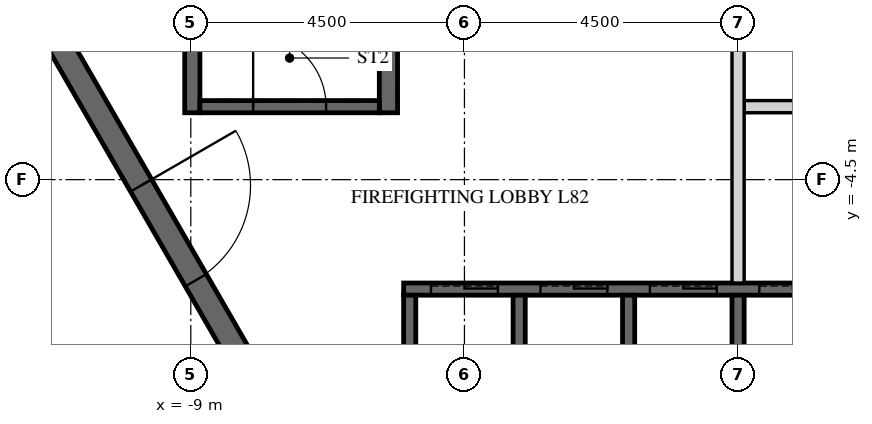
"""IFC4 building model, lengths in metres.
Left out: names, types, materials, properties, quantities, classifications, styles, units other than length and angle.
Written with IfcOpenShell. Run it as: python <this file> out.ifc"""

import sys

from ifc_helpers import new_model, si_unit, direction, frame, frame_2d, origin, place, context, subcontext, project, spatial, polyline, rectangle, outline, extrude, element, fill, save


model = new_model("IFC4")
c1 = context("Model", 3, precision=1e-05, world=origin(), true_north=direction((0.0, 1.0)))
c2 = subcontext(c1, "Body", "Model", "MODEL_VIEW")
j1 = project(units=[si_unit("LENGTHUNIT", "METRE"), si_unit("PLANEANGLEUNIT", "RADIAN")], contexts=[c1])
p1 = place(None, origin())
s1 = spatial("IfcSite", under=j1, at=p1, CompositionType="ELEMENT")
p2 = place(p1, origin())
s2 = spatial("IfcBuilding", under=s1, at=p2, CompositionType="ELEMENT")
p3 = place(p2, frame((0.0, 0.0, 338.1)))
s3 = spatial("IfcBuildingStorey", under=s2, at=p3, CompositionType="ELEMENT", Elevation=338.1)
p4 = place(p3, frame((-12.471, 0.0, -0.3), z_axis=(0.0, 0.0, 1.0), x_axis=(0.499996419489, -0.866027470984, 0.0)))
e1 = element("IfcWall", 1, at=p4, inside=s3, PredefinedType="SHEAR", context=c2, shape_type="SweptSolid", body=[
    extrude(outline(polyline([(-0.115, -0.2), (12.586, -0.2), (12.355, 0.2), (0.115, 0.2), (-0.115, -0.2)])), origin(), (0.0, 0.0, 1.0), 5.4),
])
p5 = place(p4, frame((5.306, 0.0, 0.3)))
e2 = element("IfcOpeningElement", 2, at=p5, cuts=e1, PredefinedType="OPENING", context=c2, shape_type="SweptSolid", body=[
    extrude(rectangle(XDim=1.8, YDim=2.4, at=frame_2d((0.9, 1.2))), frame((0.0, 0.21, 0.0), z_axis=(0.0, -1.0, 0.0), x_axis=(1.0, 0.0, 0.0)), (0.0, 0.0, 1.0), 0.42),
])
p6 = place(p3, frame((-5.5, -6.3, -0.25), z_axis=(0.0, 0.0, 1.0), x_axis=(1.0, 0.0, 0.0)))
e3 = element("IfcWall", 3, at=p6, inside=s3, PredefinedType="SHEAR", context=c2, shape_type="SweptSolid", body=[
    extrude(rectangle(XDim=9.2, YDim=0.2, at=frame_2d((4.6, 0.0))), origin(), (0.0, 0.0, 1.0), 5.4),
])
p7 = place(p6, frame((0.45, 0.0, 0.25)))
e4 = element("IfcOpeningElement", 4, at=p7, cuts=e3, PredefinedType="OPENING", context=c2, shape_type="SweptSolid", body=[
    extrude(rectangle(XDim=1.1, YDim=2.1, at=frame_2d((0.55, 1.05))), frame((0.0, 0.11, 0.0), z_axis=(0.0, -1.0, 0.0), x_axis=(1.0, 0.0, 0.0)), (0.0, 0.0, 1.0), 0.22),
])
p8 = place(p6, frame((2.25, 0.0, 0.25)))
e5 = element("IfcOpeningElement", 5, at=p8, cuts=e3, PredefinedType="OPENING", context=c2, shape_type="SweptSolid", body=[
    extrude(rectangle(XDim=1.1, YDim=2.1, at=frame_2d((0.55, 1.05))), frame((0.0, 0.11, 0.0), z_axis=(0.0, -1.0, 0.0), x_axis=(1.0, 0.0, 0.0)), (0.0, 0.0, 1.0), 0.22),
])
p9 = place(p6, frame((4.05, 0.0, 0.25)))
e6 = element("IfcOpeningElement", 6, at=p9, cuts=e3, PredefinedType="OPENING", context=c2, shape_type="SweptSolid", body=[
    extrude(rectangle(XDim=1.1, YDim=2.1, at=frame_2d((0.55, 1.05))), frame((0.0, 0.11, 0.0), z_axis=(0.0, -1.0, 0.0), x_axis=(1.0, 0.0, 0.0)), (0.0, 0.0, 1.0), 0.22),
])
p10 = place(p6, frame((5.85, 0.0, 0.25)))
e7 = element("IfcOpeningElement", 7, at=p10, cuts=e3, PredefinedType="OPENING", context=c2, shape_type="SweptSolid", body=[
    extrude(rectangle(XDim=1.1, YDim=2.1, at=frame_2d((0.55, 1.05))), frame((0.0, 0.11, 0.0), z_axis=(0.0, -1.0, 0.0), x_axis=(1.0, 0.0, 0.0)), (0.0, 0.0, 1.0), 0.22),
])
p11 = place(p6, frame((7.65, 0.0, 0.25)))
e8 = element("IfcOpeningElement", 8, at=p11, cuts=e3, PredefinedType="OPENING", context=c2, shape_type="SweptSolid", body=[
    extrude(rectangle(XDim=1.1, YDim=2.1, at=frame_2d((0.55, 1.05))), frame((0.0, 0.11, 0.0), z_axis=(0.0, -1.0, 0.0), x_axis=(1.0, 0.0, 0.0)), (0.0, 0.0, 1.0), 0.22),
])
for number, where, z_axis, x_axis in (
    (9, (-5.4, -9.3, -0.25), (0.0, 0.0, 1.0), (0.0, 1.0, 0.0)),
    (10, (-3.6, -9.3, -0.25), (0.0, 0.0, 1.0), (0.0, 1.0, 0.0)),
    (11, (-1.8, -9.3, -0.25), (0.0, 0.0, 1.0), (0.0, 1.0, 0.0)),
    (12, (0.0, -9.3, -0.25), (0.0, 0.0, 1.0), (0.0, 1.0, 0.0)),
):
    element("IfcWall", number, at=place(p3, frame(where, z_axis=z_axis, x_axis=x_axis)), inside=s3, PredefinedType="SHEAR", context=c2, shape_type="SweptSolid", body=[
        extrude(rectangle(XDim=2.9, YDim=0.2, at=frame_2d((1.45, 0.0))), origin(), (0.0, 0.0, 1.0), 5.4),
    ])
p12 = place(p3, frame((0.1, -3.3, 0.0), z_axis=(0.0, 0.0, 1.0), x_axis=(1.0, 0.0, 0.0)))
e13 = element("IfcWall", 13, at=p12, inside=s3, PredefinedType="PARTITIONING", context=c2, shape_type="SweptSolid", body=[
    extrude(rectangle(XDim=2.85, YDim=0.2, at=frame_2d((1.425, 0.0))), origin(), (0.0, 0.0, 1.0), 5.15),
])
p13 = place(p12, frame((0.875, 0.0, 0.0)))
e14 = element("IfcOpeningElement", 14, at=p13, cuts=e13, PredefinedType="OPENING", context=c2, shape_type="SweptSolid", body=[
    extrude(rectangle(XDim=0.9, YDim=2.1, at=frame_2d((0.45, 1.05))), frame((0.0, 0.11, 0.0), z_axis=(0.0, -1.0, 0.0), x_axis=(1.0, 0.0, 0.0)), (0.0, 0.0, 1.0), 0.22),
])
p14 = place(p3, frame((0.0, -6.2, 0.0), z_axis=(0.0, 0.0, 1.0), x_axis=(0.0, 1.0, 0.0)))
e15 = element("IfcWall", 15, at=p14, inside=s3, PredefinedType="PARTITIONING", context=c2, shape_type="SweptSolid", body=[
    extrude(rectangle(XDim=6.1, YDim=0.2, at=frame_2d((3.05, 0.0))), origin(), (0.0, 0.0, 1.0), 5.15),
])
p15 = place(p3, frame((-5.75, -3.4, -0.25), z_axis=(0.0, 0.0, 1.0), x_axis=(0.0, 1.0, 0.0)))
e16 = element("IfcWall", 16, at=p15, inside=s3, PredefinedType="SHEAR", context=c2, shape_type="SweptSolid", body=[
    extrude(rectangle(XDim=6.8, YDim=0.3, at=frame_2d((3.4, 0.0))), origin(), (0.0, 0.0, 1.0), 5.4),
])
p16 = place(p3, frame((-8.975, -3.4, -0.25), z_axis=(0.0, 0.0, 1.0), x_axis=(0.0, 1.0, 0.0)))
e17 = element("IfcWall", 17, at=p16, inside=s3, PredefinedType="SHEAR", context=c2, shape_type="SweptSolid", body=[
    extrude(rectangle(XDim=6.8, YDim=0.25, at=frame_2d((3.4, 0.0))), origin(), (0.0, 0.0, 1.0), 5.4),
])
p17 = place(p3, frame((-8.85, -3.3, -0.25), z_axis=(0.0, 0.0, 1.0), x_axis=(1.0, 0.0, 0.0)))
e18 = element("IfcWall", 18, at=p17, inside=s3, PredefinedType="SHEAR", context=c2, shape_type="SweptSolid", body=[
    extrude(rectangle(XDim=2.95, YDim=0.2, at=frame_2d((1.475, 0.0))), origin(), (0.0, 0.0, 1.0), 5.4),
])
p18 = place(p17, frame((0.875, 0.0, 0.25)))
e19 = element("IfcOpeningElement", 19, at=p18, cuts=e18, PredefinedType="OPENING", context=c2, shape_type="SweptSolid", body=[
    extrude(rectangle(XDim=1.2, YDim=2.4, at=frame_2d((0.6, 1.2))), frame((0.0, 0.11, 0.0), z_axis=(0.0, -1.0, 0.0), x_axis=(1.0, 0.0, 0.0)), (0.0, 0.0, 1.0), 0.22),
])
p19 = place(p5, origin())
e20 = element("IfcDoor", 20, at=p19, inside=s3, OperationType="DOUBLE_DOOR_SINGLE_SWING", PredefinedType="DOOR", context=c2, shape_type="SweptSolid", body=[
    extrude(rectangle(XDim=1.8, YDim=2.4, at=frame_2d((0.9, 1.2))), frame((0.0, 0.025, 0.0), z_axis=(0.0, -1.0, 0.0), x_axis=(1.0, 0.0, 0.0)), (0.0, 0.0, 1.0), 0.05),
])
fill(e2, e20)
p20 = place(p18, origin())
e21 = element("IfcDoor", 21, at=p20, inside=s3, OperationType="SINGLE_SWING_LEFT", PredefinedType="DOOR", context=c2, shape_type="SweptSolid", body=[
    extrude(rectangle(XDim=1.2, YDim=2.4, at=frame_2d((0.6, 1.2))), frame((0.0, 0.025, 0.0), z_axis=(0.0, -1.0, 0.0), x_axis=(1.0, 0.0, 0.0)), (0.0, 0.0, 1.0), 0.05),
])
fill(e19, e21)
p21 = place(p7, origin())
e22 = element("IfcDoor", 22, at=p21, inside=s3, OperationType="SLIDING_TO_LEFT", PredefinedType="DOOR", context=c2, shape_type="SweptSolid", body=[
    extrude(rectangle(XDim=1.1, YDim=2.1, at=frame_2d((0.55, 1.05))), frame((0.0, 0.025, 0.0), z_axis=(0.0, -1.0, 0.0), x_axis=(1.0, 0.0, 0.0)), (0.0, 0.0, 1.0), 0.05),
])
fill(e4, e22)
p22 = place(p8, origin())
e23 = element("IfcDoor", 23, at=p22, inside=s3, OperationType="SLIDING_TO_LEFT", PredefinedType="DOOR", context=c2, shape_type="SweptSolid", body=[
    extrude(rectangle(XDim=1.1, YDim=2.1, at=frame_2d((0.55, 1.05))), frame((0.0, 0.025, 0.0), z_axis=(0.0, -1.0, 0.0), x_axis=(1.0, 0.0, 0.0)), (0.0, 0.0, 1.0), 0.05),
])
fill(e5, e23)
p23 = place(p9, origin())
e24 = element("IfcDoor", 24, at=p23, inside=s3, OperationType="SLIDING_TO_LEFT", PredefinedType="DOOR", context=c2, shape_type="SweptSolid", body=[
    extrude(rectangle(XDim=1.1, YDim=2.1, at=frame_2d((0.55, 1.05))), frame((0.0, 0.025, 0.0), z_axis=(0.0, -1.0, 0.0), x_axis=(1.0, 0.0, 0.0)), (0.0, 0.0, 1.0), 0.05),
])
fill(e6, e24)
p24 = place(p10, origin())
e25 = element("IfcDoor", 25, at=p24, inside=s3, OperationType="SLIDING_TO_LEFT", PredefinedType="DOOR", context=c2, shape_type="SweptSolid", body=[
    extrude(rectangle(XDim=1.1, YDim=2.1, at=frame_2d((0.55, 1.05))), frame((0.0, 0.025, 0.0), z_axis=(0.0, -1.0, 0.0), x_axis=(1.0, 0.0, 0.0)), (0.0, 0.0, 1.0), 0.05),
])
fill(e7, e25)
save(model, sys.argv[1])
